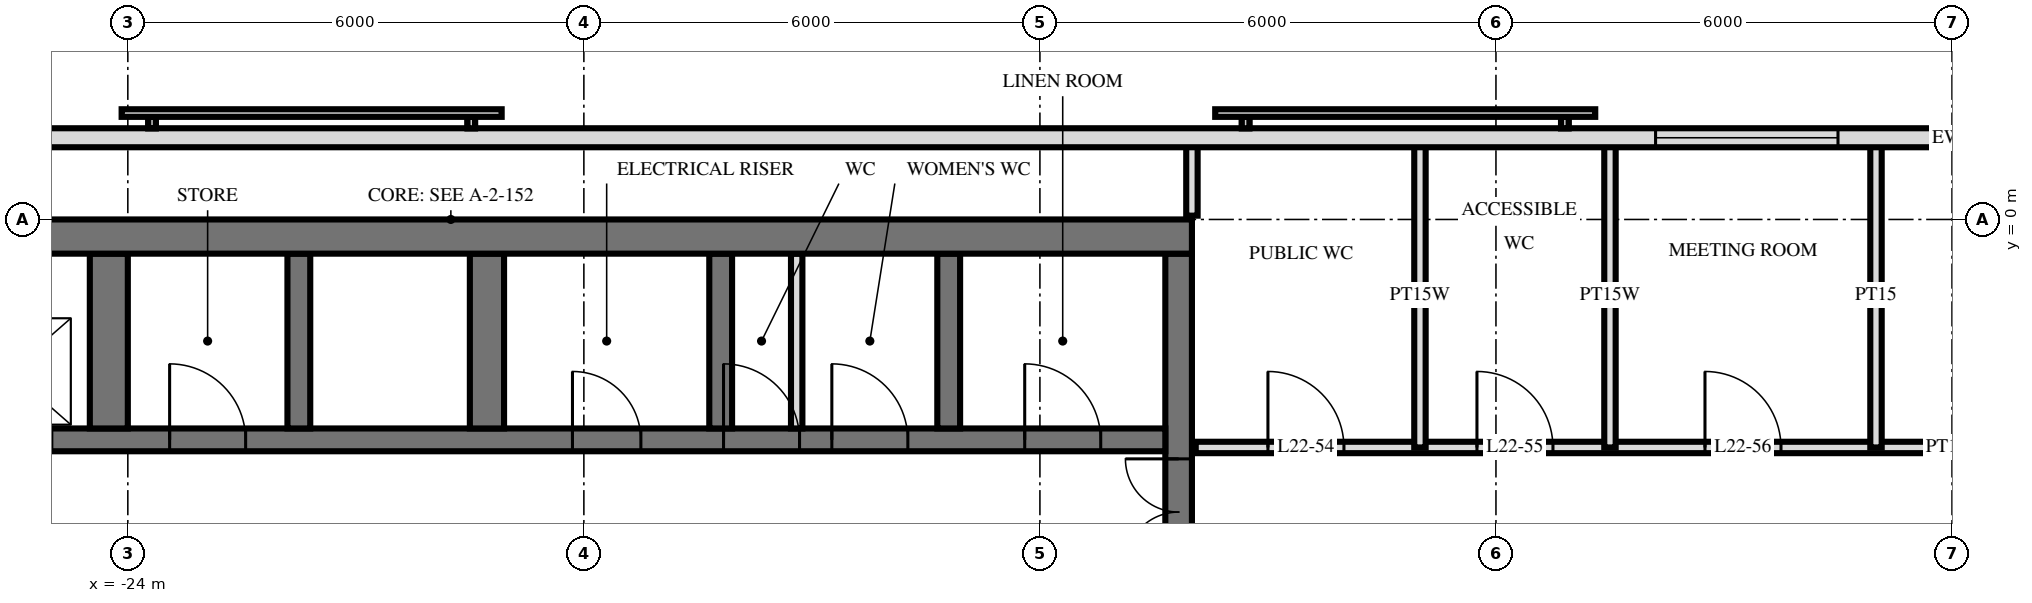
"""IFC4 building model, lengths in metres.
Left out: names, types, materials, properties, quantities, classifications, styles, units other than length and angle.
Written with IfcOpenShell. Run it as: python <this file> out.ifc"""

import sys

from ifc_helpers import new_model, si_unit, direction, frame, frame_2d, origin, place, context, subcontext, project, spatial, rectangle, extrude, element, fill, save


model = new_model("IFC4")
c1 = context("Model", 3, precision=1e-05, world=origin(), true_north=direction((0.0, 1.0)))
c2 = subcontext(c1, "Body", "Model", "MODEL_VIEW")
j1 = project(units=[si_unit("LENGTHUNIT", "METRE"), si_unit("PLANEANGLEUNIT", "RADIAN")], contexts=[c1])
p1 = place(None, origin())
s1 = spatial("IfcSite", under=j1, at=p1, CompositionType="ELEMENT")
p2 = place(p1, origin())
s2 = spatial("IfcBuilding", under=s1, at=p2, CompositionType="ELEMENT")
p3 = place(p2, frame((0.0, 0.0, 88.8)))
s3 = spatial("IfcBuildingStorey", under=s2, at=p3, CompositionType="ELEMENT", Elevation=88.8)
p4 = place(p3, frame((-29.5, -0.225, 0.0), z_axis=(0.0, 0.0, 1.0), x_axis=(1.0, 0.0, 0.0)))
e1 = element("IfcWall", 1, at=p4, inside=s3, PredefinedType="SHEAR", context=c2, shape_type="SweptSolid", body=[
    extrude(rectangle(XDim=19.5, YDim=0.45, at=frame_2d((9.75, 0.0))), origin(), (0.0, 0.0, 1.0), 3.6),
])
p5 = place(p3, frame((-10.175, -14.55, 0.0), z_axis=(0.0, 0.0, 1.0), x_axis=(0.0, 1.0, 0.0)))
e2 = element("IfcWall", 2, at=p5, inside=s3, PredefinedType="SHEAR", context=c2, shape_type="SweptSolid", body=[
    extrude(rectangle(XDim=14.1, YDim=0.35, at=frame_2d((7.05, 0.0))), origin(), (0.0, 0.0, 1.0), 3.6),
])
p6 = place(p5, frame((8.4, 0.0, 0.0)))
e3 = element("IfcOpeningElement", 3, at=p6, cuts=e2, PredefinedType="OPENING", context=c2, shape_type="SweptSolid", body=[
    extrude(rectangle(XDim=1.4, YDim=2.4, at=frame_2d((0.7, 1.2))), frame((0.0, 0.185, 0.0), z_axis=(0.0, -1.0, 0.0), x_axis=(1.0, 0.0, 0.0)), (0.0, 0.0, 1.0), 0.37),
])
p7 = place(p5, frame((10.0, 0.0, 0.0)))
e4 = element("IfcOpeningElement", 4, at=p7, cuts=e2, PredefinedType="OPENING", context=c2, shape_type="SweptSolid", body=[
    extrude(rectangle(XDim=1.4, YDim=2.4, at=frame_2d((0.7, 1.2))), frame((0.0, 0.185, 0.0), z_axis=(0.0, -1.0, 0.0), x_axis=(1.0, 0.0, 0.0)), (0.0, 0.0, 1.0), 0.37),
])
p8 = place(p5, frame((4.0, 0.0, 0.0)))
e5 = element("IfcOpeningElement", 5, at=p8, cuts=e2, PredefinedType="OPENING", context=c2, shape_type="SweptSolid", body=[
    extrude(rectangle(XDim=1.2, YDim=2.1, at=frame_2d((0.6, 1.05))), frame((0.0, 0.185, 0.0), z_axis=(0.0, -1.0, 0.0), x_axis=(1.0, 0.0, 0.0)), (0.0, 0.0, 1.0), 0.37),
])
p9 = place(p3, frame((-29.05, -2.9, 0.0), z_axis=(0.0, 0.0, 1.0), x_axis=(1.0, 0.0, 0.0)))
e6 = element("IfcWall", 6, at=p9, inside=s3, PredefinedType="SHEAR", context=c2, shape_type="SweptSolid", body=[
    extrude(rectangle(XDim=18.7, YDim=0.3, at=frame_2d((9.35, 0.0))), origin(), (0.0, 0.0, 1.0), 3.6),
])
p10 = place(p9, frame((2.95, 0.0, 0.0)))
e7 = element("IfcOpeningElement", 7, at=p10, cuts=e6, PredefinedType="OPENING", context=c2, shape_type="SweptSolid", body=[
    extrude(rectangle(XDim=1.1, YDim=2.1, at=frame_2d((0.55, 1.05))), frame((0.0, 0.16, 0.0), z_axis=(0.0, -1.0, 0.0), x_axis=(1.0, 0.0, 0.0)), (0.0, 0.0, 1.0), 0.32),
])
p11 = place(p9, frame((0.55, 0.0, 0.0)))
e8 = element("IfcOpeningElement", 8, at=p11, cuts=e6, PredefinedType="OPENING", context=c2, shape_type="SweptSolid", body=[
    extrude(rectangle(XDim=1.1, YDim=2.1, at=frame_2d((0.55, 1.05))), frame((0.0, 0.16, 0.0), z_axis=(0.0, -1.0, 0.0), x_axis=(1.0, 0.0, 0.0)), (0.0, 0.0, 1.0), 0.32),
])
p12 = place(p9, frame((10.9, 0.0, 0.0)))
e9 = element("IfcOpeningElement", 9, at=p12, cuts=e6, PredefinedType="OPENING", context=c2, shape_type="SweptSolid", body=[
    extrude(rectangle(XDim=0.9, YDim=2.1, at=frame_2d((0.45, 1.05))), frame((0.0, 0.16, 0.0), z_axis=(0.0, -1.0, 0.0), x_axis=(1.0, 0.0, 0.0)), (0.0, 0.0, 1.0), 0.32),
])
p13 = place(p9, frame((16.85, 0.0, 0.0)))
e10 = element("IfcOpeningElement", 10, at=p13, cuts=e6, PredefinedType="OPENING", context=c2, shape_type="SweptSolid", body=[
    extrude(rectangle(XDim=1.0, YDim=2.1, at=frame_2d((0.5, 1.05))), frame((0.0, 0.16, 0.0), z_axis=(0.0, -1.0, 0.0), x_axis=(1.0, 0.0, 0.0)), (0.0, 0.0, 1.0), 0.32),
])
p14 = place(p9, frame((14.312, 0.0, 0.0)))
e11 = element("IfcOpeningElement", 11, at=p14, cuts=e6, PredefinedType="OPENING", context=c2, shape_type="SweptSolid", body=[
    extrude(rectangle(XDim=1.0, YDim=2.1, at=frame_2d((0.5, 1.05))), frame((0.0, 0.16, 0.0), z_axis=(0.0, -1.0, 0.0), x_axis=(1.0, 0.0, 0.0)), (0.0, 0.0, 1.0), 0.32),
])
p15 = place(p9, frame((12.887, 0.0, 0.0)))
e12 = element("IfcOpeningElement", 12, at=p15, cuts=e6, PredefinedType="OPENING", context=c2, shape_type="SweptSolid", body=[
    extrude(rectangle(XDim=1.0, YDim=2.1, at=frame_2d((0.5, 1.05))), frame((0.0, 0.16, 0.0), z_axis=(0.0, -1.0, 0.0), x_axis=(1.0, 0.0, 0.0)), (0.0, 0.0, 1.0), 0.32),
])
p16 = place(p9, frame((5.6, 0.0, 0.0)))
e13 = element("IfcOpeningElement", 13, at=p16, cuts=e6, PredefinedType="OPENING", context=c2, shape_type="SweptSolid", body=[
    extrude(rectangle(XDim=1.0, YDim=2.1, at=frame_2d((0.5, 1.05))), frame((0.0, 0.16, 0.0), z_axis=(0.0, -1.0, 0.0), x_axis=(1.0, 0.0, 0.0)), (0.0, 0.0, 1.0), 0.32),
])
for number, where, z_axis, x_axis in (
    (14, (-13.2, -2.75, 0.0), (0.0, 0.0, 1.0), (0.0, 1.0, 0.0)),
    (15, (-16.2, -2.75, 0.0), (0.0, 0.0, 1.0), (0.0, 1.0, 0.0)),
):
    element("IfcWall", number, at=place(p3, frame(where, z_axis=z_axis, x_axis=x_axis)), inside=s3, PredefinedType="SHEAR", context=c2, shape_type="SweptSolid", body=[
        extrude(rectangle(XDim=2.3, YDim=0.3, at=frame_2d((1.15, 0.0))), origin(), (0.0, 0.0, 1.0), 3.6),
    ])
p17 = place(p3, frame((-19.275, -2.75, 0.0), z_axis=(0.0, 0.0, 1.0), x_axis=(0.0, 1.0, 0.0)))
e16 = element("IfcWall", 16, at=p17, inside=s3, PredefinedType="SHEAR", context=c2, shape_type="SweptSolid", body=[
    extrude(rectangle(XDim=2.3, YDim=0.45, at=frame_2d((1.15, 0.0))), origin(), (0.0, 0.0, 1.0), 3.6),
])
p18 = place(p3, frame((-21.75, -2.75, 0.0), z_axis=(0.0, 0.0, 1.0), x_axis=(0.0, 1.0, 0.0)))
e17 = element("IfcWall", 17, at=p18, inside=s3, PredefinedType="SHEAR", context=c2, shape_type="SweptSolid", body=[
    extrude(rectangle(XDim=2.3, YDim=0.3, at=frame_2d((1.15, 0.0))), origin(), (0.0, 0.0, 1.0), 3.6),
])
p19 = place(p3, frame((-24.25, -2.75, 0.0), z_axis=(0.0, 0.0, 1.0), x_axis=(0.0, 1.0, 0.0)))
e18 = element("IfcWall", 18, at=p19, inside=s3, PredefinedType="SHEAR", context=c2, shape_type="SweptSolid", body=[
    extrude(rectangle(XDim=2.3, YDim=0.5, at=frame_2d((1.15, 0.0))), origin(), (0.0, 0.0, 1.0), 3.6),
])
p20 = place(p3, frame((28.775, 1.075, 0.0), z_axis=(0.0, 0.0, 1.0), x_axis=(-1.0, 0.0, 0.0)))
e19 = element("IfcWall", 19, at=p20, inside=s3, PredefinedType="SOLIDWALL", context=c2, shape_type="SweptSolid", body=[
    extrude(rectangle(XDim=57.551, YDim=0.25, at=frame_2d((28.775, 0.0))), origin(), (0.0, 0.0, 1.0), 3.32),
])
p21 = place(p20, frame((21.275, 0.0, 0.3)))
e20 = element("IfcOpeningElement", 20, at=p21, cuts=e19, PredefinedType="OPENING", context=c2, shape_type="SweptSolid", body=[
    extrude(rectangle(XDim=2.4, YDim=2.1, at=frame_2d((1.2, 1.05))), frame((0.0, 0.135, 0.0), z_axis=(0.0, -1.0, 0.0), x_axis=(1.0, 0.0, 0.0)), (0.0, 0.0, 1.0), 0.27),
])
p22 = place(p20, frame((24.275, 0.0, 0.3)))
e21 = element("IfcOpeningElement", 21, at=p22, cuts=e19, PredefinedType="OPENING", context=c2, shape_type="SweptSolid", body=[
    extrude(rectangle(XDim=2.4, YDim=2.1, at=frame_2d((1.2, 1.05))), frame((0.0, 0.135, 0.0), z_axis=(0.0, -1.0, 0.0), x_axis=(1.0, 0.0, 0.0)), (0.0, 0.0, 1.0), 0.27),
])
p23 = place(p20, frame((30.275, 0.0, 0.3)))
e22 = element("IfcOpeningElement", 22, at=p23, cuts=e19, PredefinedType="OPENING", context=c2, shape_type="SweptSolid", body=[
    extrude(rectangle(XDim=2.4, YDim=2.1, at=frame_2d((1.2, 1.05))), frame((0.0, 0.135, 0.0), z_axis=(0.0, -1.0, 0.0), x_axis=(1.0, 0.0, 0.0)), (0.0, 0.0, 1.0), 0.27),
])
p24 = place(p3, frame((-15.2, -2.75, 0.0), z_axis=(0.0, 0.0, 1.0), x_axis=(0.0, 1.0, 0.0)))
e23 = element("IfcWall", 23, at=p24, inside=s3, PredefinedType="PARTITIONING", context=c2, shape_type="SweptSolid", body=[
    extrude(rectangle(XDim=2.3, YDim=0.15, at=frame_2d((1.15, 0.0))), origin(), (0.0, 0.0, 1.0), 3.3),
])
p25 = place(p3, frame((-1.0, -3.0, 0.0), z_axis=(0.0, 0.0, 1.0), x_axis=(0.0, 1.0, 0.0)))
e24 = element("IfcWall", 24, at=p25, inside=s3, PredefinedType="PARTITIONING", context=c2, shape_type="SweptSolid", body=[
    extrude(rectangle(XDim=4.02, YDim=0.15, at=frame_2d((2.01, 0.0))), origin(), (0.0, 0.0, 1.0), 3.32),
])
for number, where, z_axis, x_axis in (
    (25, (-4.5, -3.0, 0.0), (0.0, 0.0, 1.0), (0.0, 1.0, 0.0)),
    (26, (-7.0, -3.0, 0.0), (0.0, 0.0, 1.0), (0.0, 1.0, 0.0)),
):
    element("IfcWall", number, at=place(p3, frame(where, z_axis=z_axis, x_axis=x_axis)), inside=s3, PredefinedType="PLUMBINGWALL", context=c2, shape_type="SweptSolid", body=[
        extrude(rectangle(XDim=4.02, YDim=0.15, at=frame_2d((2.01, 0.0))), origin(), (0.0, 0.0, 1.0), 3.32),
    ])
p26 = place(p3, frame((-10.0, 0.05, 0.0), z_axis=(0.0, 0.0, 1.0), x_axis=(0.0, 1.0, 0.0)))
e27 = element("IfcWall", 27, at=p26, inside=s3, PredefinedType="PLUMBINGWALL", context=c2, shape_type="SweptSolid", body=[
    extrude(rectangle(XDim=0.97, YDim=0.15, at=frame_2d((0.485, 0.0))), origin(), (0.0, 0.0, 1.0), 3.32),
])
p27 = place(p3, frame((-9.95, -3.0, 0.0), z_axis=(0.0, 0.0, 1.0), x_axis=(1.0, 0.0, 0.0)))
e28 = element("IfcWall", 28, at=p27, inside=s3, PredefinedType="PARTITIONING", context=c2, shape_type="SweptSolid", body=[
    extrude(rectangle(XDim=19.9, YDim=0.15, at=frame_2d((9.95, 0.0))), origin(), (0.0, 0.0, 1.0), 3.32),
])
p28 = place(p27, frame((0.95, 0.0, 0.0)))
e29 = element("IfcOpeningElement", 29, at=p28, cuts=e28, PredefinedType="OPENING", context=c2, shape_type="SweptSolid", body=[
    extrude(rectangle(XDim=1.0, YDim=2.1, at=frame_2d((0.5, 1.05))), frame((0.0, 0.085, 0.0), z_axis=(0.0, -1.0, 0.0), x_axis=(1.0, 0.0, 0.0)), (0.0, 0.0, 1.0), 0.17),
])
p29 = place(p27, frame((3.7, 0.0, 0.0)))
e30 = element("IfcOpeningElement", 30, at=p29, cuts=e28, PredefinedType="OPENING", context=c2, shape_type="SweptSolid", body=[
    extrude(rectangle(XDim=1.0, YDim=2.1, at=frame_2d((0.5, 1.05))), frame((0.0, 0.085, 0.0), z_axis=(0.0, -1.0, 0.0), x_axis=(1.0, 0.0, 0.0)), (0.0, 0.0, 1.0), 0.17),
])
p30 = place(p27, frame((6.7, 0.0, 0.0)))
e31 = element("IfcOpeningElement", 31, at=p30, cuts=e28, PredefinedType="OPENING", context=c2, shape_type="SweptSolid", body=[
    extrude(rectangle(XDim=1.0, YDim=2.1, at=frame_2d((0.5, 1.05))), frame((0.0, 0.085, 0.0), z_axis=(0.0, -1.0, 0.0), x_axis=(1.0, 0.0, 0.0)), (0.0, 0.0, 1.0), 0.17),
])
p31 = place(p27, frame((13.95, 0.0, 0.0)))
e32 = element("IfcOpeningElement", 32, at=p31, cuts=e28, PredefinedType="OPENING", context=c2, shape_type="SweptSolid", body=[
    extrude(rectangle(XDim=1.0, YDim=2.1, at=frame_2d((0.5, 1.05))), frame((0.0, 0.085, 0.0), z_axis=(0.0, -1.0, 0.0), x_axis=(1.0, 0.0, 0.0)), (0.0, 0.0, 1.0), 0.17),
])
p32 = place(p23, origin())
e33 = element("IfcWindow", 33, at=p32, inside=s3, PartitioningType="SINGLE_PANEL", PredefinedType="WINDOW", context=c2, shape_type="SweptSolid", body=[
    extrude(rectangle(XDim=2.4, YDim=2.1, at=frame_2d((1.2, 1.05))), frame((0.0, 0.03, 0.0), z_axis=(0.0, -1.0, 0.0), x_axis=(1.0, 0.0, 0.0)), (0.0, 0.0, 1.0), 0.06),
])
fill(e22, e33)
p33 = place(p7, origin())
e34 = element("IfcDoor", 34, at=p33, inside=s3, OperationType="DOUBLE_DOOR_SINGLE_SWING", PredefinedType="DOOR", context=c2, shape_type="SweptSolid", body=[
    extrude(rectangle(XDim=1.4, YDim=2.4, at=frame_2d((0.7, 1.2))), frame((0.0, 0.025, 0.0), z_axis=(0.0, -1.0, 0.0), x_axis=(1.0, 0.0, 0.0)), (0.0, 0.0, 1.0), 0.05),
])
fill(e4, e34)
p34 = place(p12, origin())
e35 = element("IfcDoor", 35, at=p34, inside=s3, OperationType="SINGLE_SWING_RIGHT", PredefinedType="DOOR", context=c2, shape_type="SweptSolid", body=[
    extrude(rectangle(XDim=0.9, YDim=2.1, at=frame_2d((0.45, 1.05))), frame((0.0, 0.025, 0.0), z_axis=(0.0, -1.0, 0.0), x_axis=(1.0, 0.0, 0.0)), (0.0, 0.0, 1.0), 0.05),
])
fill(e9, e35)
p35 = place(p13, origin())
e36 = element("IfcDoor", 36, at=p35, inside=s3, OperationType="SINGLE_SWING_RIGHT", PredefinedType="DOOR", context=c2, shape_type="SweptSolid", body=[
    extrude(rectangle(XDim=1.0, YDim=2.1, at=frame_2d((0.5, 1.05))), frame((0.0, 0.025, 0.0), z_axis=(0.0, -1.0, 0.0), x_axis=(1.0, 0.0, 0.0)), (0.0, 0.0, 1.0), 0.05),
])
fill(e10, e36)
p36 = place(p14, origin())
e37 = element("IfcDoor", 37, at=p36, inside=s3, OperationType="SINGLE_SWING_RIGHT", PredefinedType="DOOR", context=c2, shape_type="SweptSolid", body=[
    extrude(rectangle(XDim=1.0, YDim=2.1, at=frame_2d((0.5, 1.05))), frame((0.0, 0.025, 0.0), z_axis=(0.0, -1.0, 0.0), x_axis=(1.0, 0.0, 0.0)), (0.0, 0.0, 1.0), 0.05),
])
fill(e11, e37)
p37 = place(p15, origin())
e38 = element("IfcDoor", 38, at=p37, inside=s3, OperationType="SINGLE_SWING_RIGHT", PredefinedType="DOOR", context=c2, shape_type="SweptSolid", body=[
    extrude(rectangle(XDim=1.0, YDim=2.1, at=frame_2d((0.5, 1.05))), frame((0.0, 0.025, 0.0), z_axis=(0.0, -1.0, 0.0), x_axis=(1.0, 0.0, 0.0)), (0.0, 0.0, 1.0), 0.05),
])
fill(e12, e38)
p38 = place(p16, origin())
e39 = element("IfcDoor", 39, at=p38, inside=s3, OperationType="SINGLE_SWING_RIGHT", PredefinedType="DOOR", context=c2, shape_type="SweptSolid", body=[
    extrude(rectangle(XDim=1.0, YDim=2.1, at=frame_2d((0.5, 1.05))), frame((0.0, 0.025, 0.0), z_axis=(0.0, -1.0, 0.0), x_axis=(1.0, 0.0, 0.0)), (0.0, 0.0, 1.0), 0.05),
])
fill(e13, e39)
p39 = place(p28, origin())
e40 = element("IfcDoor", 40, at=p39, inside=s3, OperationType="SINGLE_SWING_RIGHT", PredefinedType="DOOR", context=c2, shape_type="SweptSolid", body=[
    extrude(rectangle(XDim=1.0, YDim=2.1, at=frame_2d((0.5, 1.05))), frame((0.0, 0.025, 0.0), z_axis=(0.0, -1.0, 0.0), x_axis=(1.0, 0.0, 0.0)), (0.0, 0.0, 1.0), 0.05),
])
fill(e29, e40)
p40 = place(p29, origin())
e41 = element("IfcDoor", 41, at=p40, inside=s3, OperationType="SINGLE_SWING_RIGHT", PredefinedType="DOOR", context=c2, shape_type="SweptSolid", body=[
    extrude(rectangle(XDim=1.0, YDim=2.1, at=frame_2d((0.5, 1.05))), frame((0.0, 0.025, 0.0), z_axis=(0.0, -1.0, 0.0), x_axis=(1.0, 0.0, 0.0)), (0.0, 0.0, 1.0), 0.05),
])
fill(e30, e41)
p41 = place(p30, origin())
e42 = element("IfcDoor", 42, at=p41, inside=s3, OperationType="SINGLE_SWING_RIGHT", PredefinedType="DOOR", context=c2, shape_type="SweptSolid", body=[
    extrude(rectangle(XDim=1.0, YDim=2.1, at=frame_2d((0.5, 1.05))), frame((0.0, 0.025, 0.0), z_axis=(0.0, -1.0, 0.0), x_axis=(1.0, 0.0, 0.0)), (0.0, 0.0, 1.0), 0.05),
])
fill(e31, e42)
save(model, sys.argv[1])
